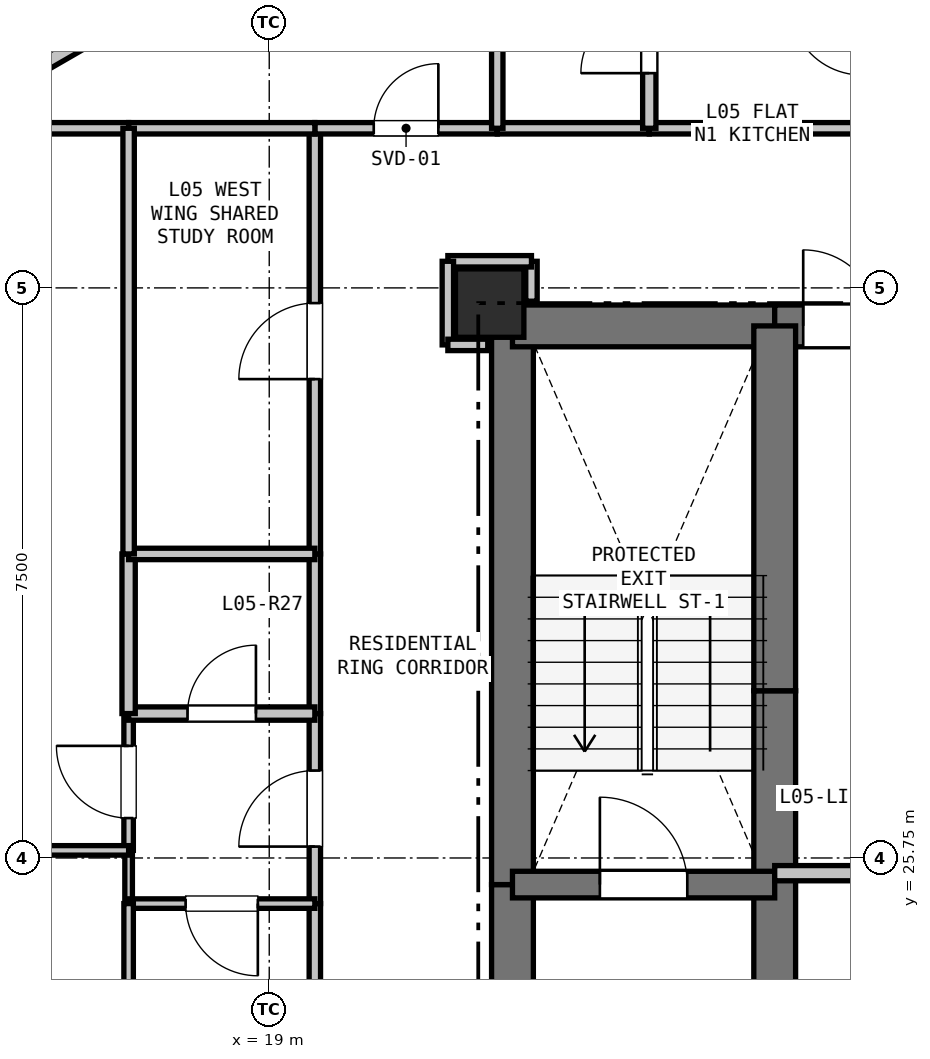
"""IFC4 building model, lengths in metres.
Left out: names, types, materials, properties, quantities, classifications, styles, units other than length and angle.
Written with IfcOpenShell. Run it as: python <this file> out.ifc"""

import sys

from ifc_helpers import new_model, si_unit, direction, frame, frame_2d, origin, origin_2d, place, context, subcontext, project, spatial, rectangle, extrude, element, fill, save


model = new_model("IFC4")
c1 = context("Model", 3, precision=1e-05, world=origin(), true_north=direction((0.0, 1.0)))
c2 = subcontext(c1, "Body", "Model", "MODEL_VIEW")
j1 = project(units=[si_unit("LENGTHUNIT", "METRE"), si_unit("PLANEANGLEUNIT", "RADIAN")], contexts=[c1])
p1 = place(None, origin())
s1 = spatial("IfcSite", under=j1, at=p1, CompositionType="ELEMENT")
p2 = place(p1, origin())
s2 = spatial("IfcBuilding", under=s1, at=p2, CompositionType="ELEMENT")
p3 = place(p2, frame((0.0, 0.0, 22.5)))
s3 = spatial("IfcBuildingStorey", under=s2, at=p3, CompositionType="ELEMENT", Elevation=22.5)
p4 = place(p3, frame((21.9, 33.05, 0.0), z_axis=(0.0, 0.0, 1.0), x_axis=(1.0, 0.0, 0.0)))
e1 = element("IfcColumn", 1, at=p4, inside=s3, PredefinedType="COLUMN", context=c2, shape_type="SweptSolid", body=[
    extrude(rectangle(XDim=0.9, YDim=0.9, at=origin_2d()), origin(), (0.0, 0.0, 1.0), 3.3),
])
p5 = place(p3, frame((15.008, 35.611, 0.0), z_axis=(0.0, 0.0, 1.0), x_axis=(0.86605165483, 0.499954529098, 0.0)))
e2 = element("IfcWall", 2, at=p5, inside=s3, PredefinedType="PARAPET", context=c2, shape_type="SweptSolid", body=[
    extrude(rectangle(XDim=1.7, YDim=0.2, at=frame_2d((0.85, 0.0))), origin(), (0.0, 0.0, 1.0), 2.66),
])
p6 = place(p3, frame((22.2, 20.75, 0.0), z_axis=(0.0, 0.0, 1.0), x_axis=(0.0, 1.0, 0.0)))
e3 = element("IfcWall", 3, at=p6, inside=s3, PredefinedType="SHEAR", context=c2, shape_type="SweptSolid", body=[
    extrude(rectangle(XDim=4.65, YDim=0.55, at=frame_2d((2.325, 0.0))), origin(), (0.0, 0.0, 1.0), 3.04),
])
p7 = place(p3, frame((22.2, 25.4, 0.0), z_axis=(0.0, 0.0, 1.0), x_axis=(0.0, 1.0, 0.0)))
e4 = element("IfcWall", 4, at=p7, inside=s3, PredefinedType="SHEAR", context=c2, shape_type="SweptSolid", body=[
    extrude(rectangle(XDim=7.35, YDim=0.55, at=frame_2d((3.675, 0.0))), origin(), (0.0, 0.0, 1.0), 3.04),
])
p8 = place(p3, frame((22.2, 32.75, 0.0), z_axis=(0.0, 0.0, 1.0), x_axis=(1.0, 0.0, 0.0)))
e5 = element("IfcWall", 5, at=p8, inside=s3, PredefinedType="SHEAR", context=c2, shape_type="SweptSolid", body=[
    extrude(rectangle(XDim=3.45, YDim=0.55, at=frame_2d((1.725, 0.0))), origin(), (0.0, 0.0, 1.0), 3.04),
])
p9 = place(p3, frame((25.65, 32.75, 0.0), z_axis=(0.0, 0.0, 1.0), x_axis=(1.0, 0.0, 0.0)))
e6 = element("IfcWall", 6, at=p9, inside=s3, PredefinedType="SHEAR", context=c2, shape_type="SweptSolid", body=[
    extrude(rectangle(XDim=1.75, YDim=0.55, at=frame_2d((0.875, 0.0))), origin(), (0.0, 0.0, 1.0), 3.04),
])
p10 = place(p9, frame((0.375, 0.0, 0.0)))
e7 = element("IfcOpeningElement", 7, at=p10, cuts=e6, PredefinedType="OPENING", context=c2, shape_type="SweptSolid", body=[
    extrude(rectangle(XDim=1.0, YDim=2.15, at=frame_2d((0.5, 1.075))), frame((0.0, 0.285, 0.0), z_axis=(0.0, -1.0, 0.0), x_axis=(1.0, 0.0, 0.0)), (0.0, 0.0, 1.0), 0.57),
])
p11 = place(p3, frame((25.65, 22.75, 0.0), z_axis=(0.0, 0.0, 1.0), x_axis=(0.0, 1.0, 0.0)))
e8 = element("IfcWall", 8, at=p11, inside=s3, PredefinedType="SHEAR", context=c2, shape_type="SweptSolid", body=[
    extrude(rectangle(XDim=2.8, YDim=0.55, at=frame_2d((1.4, 0.0))), origin(), (0.0, 0.0, 1.0), 3.04),
])
p12 = place(p3, frame((25.65, 25.55, 0.0), z_axis=(0.0, 0.0, 1.0), x_axis=(0.0, 1.0, 0.0)))
e9 = element("IfcWall", 9, at=p12, inside=s3, PredefinedType="SHEAR", context=c2, shape_type="SweptSolid", body=[
    extrude(rectangle(XDim=2.4, YDim=0.55, at=frame_2d((1.2, 0.0))), origin(), (0.0, 0.0, 1.0), 3.04),
])
p13 = place(p3, frame((25.65, 27.95, 0.0), z_axis=(0.0, 0.0, 1.0), x_axis=(0.0, 1.0, 0.0)))
e10 = element("IfcWall", 10, at=p13, inside=s3, PredefinedType="SHEAR", context=c2, shape_type="SweptSolid", body=[
    extrude(rectangle(XDim=4.8, YDim=0.55, at=frame_2d((2.4, 0.0))), origin(), (0.0, 0.0, 1.0), 3.04),
])
p14 = place(p3, frame((22.2, 25.4, 0.0), z_axis=(0.0, 0.0, 1.0), x_axis=(1.0, 0.0, 0.0)))
e11 = element("IfcWall", 11, at=p14, inside=s3, PredefinedType="SHEAR", context=c2, shape_type="SweptSolid", body=[
    extrude(rectangle(XDim=3.45, YDim=0.35, at=frame_2d((1.725, 0.0))), origin(), (0.0, 0.0, 1.0), 3.04),
])
p15 = place(p14, frame((1.15, 0.0, 0.0)))
e12 = element("IfcOpeningElement", 12, at=p15, cuts=e11, PredefinedType="OPENING", context=c2, shape_type="SweptSolid", body=[
    extrude(rectangle(XDim=1.15, YDim=2.15, at=frame_2d((0.575, 1.075))), frame((0.0, 0.185, 0.0), z_axis=(0.0, -1.0, 0.0), x_axis=(1.0, 0.0, 0.0)), (0.0, 0.0, 1.0), 0.37),
])
p16 = place(p3, frame((25.65, 25.55, 0.0), z_axis=(0.0, 0.0, 1.0), x_axis=(1.0, 0.0, 0.0)))
e13 = element("IfcWall", 13, at=p16, inside=s3, PredefinedType="PARTITIONING", context=c2, shape_type="SweptSolid", body=[
    extrude(rectangle(XDim=4.95, YDim=0.2, at=frame_2d((2.475, 0.0))), origin(), (0.0, 0.0, 1.0), 3.04),
])
p17 = place(p3, frame((19.6, 21.15, 0.0), z_axis=(0.0, 0.0, 1.0), x_axis=(0.0, 1.0, 0.0)))
e14 = element("IfcWall", 14, at=p17, inside=s3, PredefinedType="PARTITIONING", context=c2, shape_type="SweptSolid", body=[
    extrude(rectangle(XDim=4.0, YDim=0.15, at=frame_2d((2.0, 0.0))), origin(), (0.0, 0.0, 1.0), 3.04),
])
p18 = place(p3, frame((19.6, 25.15, 0.0), z_axis=(0.0, 0.0, 1.0), x_axis=(0.0, 1.0, 0.0)))
e15 = element("IfcWall", 15, at=p18, inside=s3, PredefinedType="PARTITIONING", context=c2, shape_type="SweptSolid", body=[
    extrude(rectangle(XDim=2.5, YDim=0.15, at=frame_2d((1.25, 0.0))), origin(), (0.0, 0.0, 1.0), 3.04),
])
p19 = place(p18, frame((0.75, 0.0, 0.0)))
e16 = element("IfcOpeningElement", 16, at=p19, cuts=e15, PredefinedType="OPENING", context=c2, shape_type="SweptSolid", body=[
    extrude(rectangle(XDim=1.0, YDim=2.15, at=frame_2d((0.5, 1.075))), frame((0.0, 0.085, 0.0), z_axis=(0.0, -1.0, 0.0), x_axis=(1.0, 0.0, 0.0)), (0.0, 0.0, 1.0), 0.17),
])
p20 = place(p3, frame((19.6, 27.65, 0.0), z_axis=(0.0, 0.0, 1.0), x_axis=(0.0, 1.0, 0.0)))
e17 = element("IfcWall", 17, at=p20, inside=s3, PredefinedType="PARTITIONING", context=c2, shape_type="SweptSolid", body=[
    extrude(rectangle(XDim=2.1, YDim=0.15, at=frame_2d((1.05, 0.0))), origin(), (0.0, 0.0, 1.0), 3.04),
])
p21 = place(p3, frame((19.6, 29.75, 0.0), z_axis=(0.0, 0.0, 1.0), x_axis=(0.0, 1.0, 0.0)))
e18 = element("IfcWall", 18, at=p21, inside=s3, PredefinedType="PARTITIONING", context=c2, shape_type="SweptSolid", body=[
    extrude(rectangle(XDim=5.6, YDim=0.15, at=frame_2d((2.8, 0.0))), origin(), (0.0, 0.0, 1.0), 2.337),
])
p22 = place(p21, frame((2.3, 0.0, 0.0)))
e19 = element("IfcOpeningElement", 19, at=p22, cuts=e18, PredefinedType="OPENING", context=c2, shape_type="SweptSolid", body=[
    extrude(rectangle(XDim=1.0, YDim=2.15, at=frame_2d((0.5, 1.075))), frame((0.0, 0.085, 0.0), z_axis=(0.0, -1.0, 0.0), x_axis=(1.0, 0.0, 0.0)), (0.0, 0.0, 1.0), 0.17),
])
p23 = place(p3, frame((19.6, 35.35, 0.0), z_axis=(0.0, 0.0, 1.0), x_axis=(1.0, 0.0, 0.0)))
e20 = element("IfcWall", 20, at=p23, inside=s3, PredefinedType="PARTITIONING", context=c2, shape_type="SweptSolid", body=[
    extrude(rectangle(XDim=2.4, YDim=0.15, at=frame_2d((1.2, 0.0))), origin(), (0.0, 0.0, 1.0), 3.04),
])
p24 = place(p23, frame((0.775, 0.0, 0.0)))
e21 = element("IfcOpeningElement", 21, at=p24, cuts=e20, PredefinedType="OPENING", context=c2, shape_type="SweptSolid", body=[
    extrude(rectangle(XDim=0.85, YDim=2.1, at=frame_2d((0.425, 1.05))), frame((0.0, 0.085, 0.0), z_axis=(0.0, -1.0, 0.0), x_axis=(1.0, 0.0, 0.0)), (0.0, 0.0, 1.0), 0.17),
])
p25 = place(p3, frame((22.0, 35.35, 0.0), z_axis=(0.0, 0.0, 1.0), x_axis=(1.0, 0.0, 0.0)))
e22 = element("IfcWall", 22, at=p25, inside=s3, PredefinedType="PARTITIONING", context=c2, shape_type="SweptSolid", body=[
    extrude(rectangle(XDim=2.0, YDim=0.15, at=frame_2d((1.0, 0.0))), origin(), (0.0, 0.0, 1.0), 3.04),
])
p26 = place(p3, frame((24.0, 35.35, 0.0), z_axis=(0.0, 0.0, 1.0), x_axis=(1.0, 0.0, 0.0)))
e23 = element("IfcWall", 23, at=p26, inside=s3, PredefinedType="PARTITIONING", context=c2, shape_type="SweptSolid", body=[
    extrude(rectangle(XDim=2.8, YDim=0.15, at=frame_2d((1.4, 0.0))), origin(), (0.0, 0.0, 1.0), 3.04),
])
p27 = place(p3, frame((22.45, 33.075, 0.0), z_axis=(0.0, 0.0, 1.0), x_axis=(0.0, 1.0, 0.0)))
e24 = element("IfcWall", 24, at=p27, inside=s3, PredefinedType="PARTITIONING", context=c2, shape_type="SweptSolid", body=[
    extrude(rectangle(XDim=0.525, YDim=0.15, at=frame_2d((0.263, 0.0))), origin(), (0.0, 0.0, 1.0), 2.488),
])
p28 = place(p3, frame((22.45, 33.6, 0.0), z_axis=(0.0, 0.0, 1.0), x_axis=(-1.0, 0.0, 0.0)))
e25 = element("IfcWall", 25, at=p28, inside=s3, PredefinedType="PARTITIONING", context=c2, shape_type="SweptSolid", body=[
    extrude(rectangle(XDim=1.1, YDim=0.15, at=frame_2d((0.55, 0.0))), origin(), (0.0, 0.0, 1.0), 3.04),
])
p29 = place(p3, frame((21.35, 33.6, 0.0), z_axis=(0.0, 0.0, 1.0), x_axis=(0.0, -1.0, 0.0)))
e26 = element("IfcWall", 26, at=p29, inside=s3, PredefinedType="PARTITIONING", context=c2, shape_type="SweptSolid", body=[
    extrude(rectangle(XDim=1.1, YDim=0.15, at=frame_2d((0.55, 0.0))), origin(), (0.0, 0.0, 1.0), 2.337),
])
p30 = place(p3, frame((21.35, 32.5, 0.0), z_axis=(0.0, 0.0, 1.0), x_axis=(1.0, 0.0, 0.0)))
e27 = element("IfcWall", 27, at=p30, inside=s3, PredefinedType="PARTITIONING", context=c2, shape_type="SweptSolid", body=[
    extrude(rectangle(XDim=0.525, YDim=0.15, at=frame_2d((0.262, 0.0))), origin(), (0.0, 0.0, 1.0), 2.488),
])
p31 = place(p3, frame((17.15, 25.15, 0.0), z_axis=(0.0, 0.0, 1.0), x_axis=(0.0, 1.0, 0.0)))
e28 = element("IfcWall", 28, at=p31, inside=s3, PredefinedType="PARTITIONING", context=c2, shape_type="SweptSolid", body=[
    extrude(rectangle(XDim=0.7, YDim=0.1, at=frame_2d((0.35, 0.0))), origin(), (0.0, 0.0, 1.0), 3.04),
])
p32 = place(p3, frame((17.15, 25.85, 0.0), z_axis=(0.0, 0.0, 1.0), x_axis=(0.0, 1.0, 0.0)))
e29 = element("IfcWall", 29, at=p32, inside=s3, PredefinedType="PARTITIONING", context=c2, shape_type="SweptSolid", body=[
    extrude(rectangle(XDim=1.8, YDim=0.125, at=frame_2d((0.9, 0.0))), origin(), (0.0, 0.0, 1.0), 3.04),
])
p33 = place(p32, frame((0.425, 0.0, 0.0)))
e30 = element("IfcOpeningElement", 30, at=p33, cuts=e29, PredefinedType="OPENING", context=c2, shape_type="SweptSolid", body=[
    extrude(rectangle(XDim=0.95, YDim=2.1, at=frame_2d((0.475, 1.05))), frame((0.0, 0.073, 0.0), z_axis=(0.0, -1.0, 0.0), x_axis=(1.0, 0.0, 0.0)), (0.0, 0.0, 1.0), 0.145),
])
p34 = place(p3, frame((17.15, 27.65, 0.0), z_axis=(0.0, 0.0, 1.0), x_axis=(1.0, 0.0, 0.0)))
e31 = element("IfcWall", 31, at=p34, inside=s3, PredefinedType="PLUMBINGWALL", context=c2, shape_type="SweptSolid", body=[
    extrude(rectangle(XDim=2.45, YDim=0.175, at=frame_2d((1.225, 0.0))), origin(), (0.0, 0.0, 1.0), 3.04),
])
p35 = place(p34, frame((0.775, 0.0, 0.0)))
e32 = element("IfcOpeningElement", 32, at=p35, cuts=e31, PredefinedType="OPENING", context=c2, shape_type="SweptSolid", body=[
    extrude(rectangle(XDim=0.9, YDim=2.1, at=frame_2d((0.45, 1.05))), frame((0.0, 0.097, 0.0), z_axis=(0.0, -1.0, 0.0), x_axis=(1.0, 0.0, 0.0)), (0.0, 0.0, 1.0), 0.195),
])
p36 = place(p3, frame((19.6, 25.15, 0.0), z_axis=(0.0, 0.0, 1.0), x_axis=(-1.0, 0.0, 0.0)))
e33 = element("IfcWall", 33, at=p36, inside=s3, PredefinedType="PARTITIONING", context=c2, shape_type="SweptSolid", body=[
    extrude(rectangle(XDim=2.45, YDim=0.125, at=frame_2d((1.225, 0.0))), origin(), (0.0, 0.0, 1.0), 3.04),
])
p37 = place(p36, frame((0.75, 0.0, 0.0)))
e34 = element("IfcOpeningElement", 34, at=p37, cuts=e33, PredefinedType="OPENING", context=c2, shape_type="SweptSolid", body=[
    extrude(rectangle(XDim=0.95, YDim=2.1, at=frame_2d((0.475, 1.05))), frame((0.0, 0.073, 0.0), z_axis=(0.0, -1.0, 0.0), x_axis=(1.0, 0.0, 0.0)), (0.0, 0.0, 1.0), 0.145),
])
p38 = place(p3, frame((24.0, 35.35, 0.0), z_axis=(0.0, 0.0, 1.0), x_axis=(0.0, 1.0, 0.0)))
e35 = element("IfcWall", 35, at=p38, inside=s3, PredefinedType="PLUMBINGWALL", context=c2, shape_type="SweptSolid", body=[
    extrude(rectangle(XDim=2.35, YDim=0.175, at=frame_2d((1.175, 0.0))), origin(), (0.0, 0.0, 1.0), 3.04),
])
p39 = place(p38, frame((0.725, 0.0, 0.0)))
e36 = element("IfcOpeningElement", 36, at=p39, cuts=e35, PredefinedType="OPENING", context=c2, shape_type="SweptSolid", body=[
    extrude(rectangle(XDim=0.9, YDim=2.1, at=frame_2d((0.45, 1.05))), frame((0.0, 0.097, 0.0), z_axis=(0.0, -1.0, 0.0), x_axis=(1.0, 0.0, 0.0)), (0.0, 0.0, 1.0), 0.195),
])
p40 = place(p3, frame((22.0, 35.35, 0.0), z_axis=(0.0, 0.0, 1.0), x_axis=(0.0, 1.0, 0.0)))
e37 = element("IfcWall", 37, at=p40, inside=s3, PredefinedType="PARTITIONING", context=c2, shape_type="SweptSolid", body=[
    extrude(rectangle(XDim=2.35, YDim=0.15, at=frame_2d((1.175, 0.0))), origin(), (0.0, 0.0, 1.0), 3.04),
])
p41 = place(p3, frame((17.15, 27.65, 0.0), z_axis=(0.0, 0.0, 1.0), x_axis=(0.0, 1.0, 0.0)))
e38 = element("IfcWall", 38, at=p41, inside=s3, PredefinedType="PLUMBINGWALL", context=c2, shape_type="SweptSolid", body=[
    extrude(rectangle(XDim=2.1, YDim=0.175, at=frame_2d((1.05, 0.0))), origin(), (0.0, 0.0, 1.0), 3.04),
])
p42 = place(p3, frame((17.15, 29.75, 0.0), z_axis=(0.0, 0.0, 1.0), x_axis=(1.0, 0.0, 0.0)))
e39 = element("IfcWall", 39, at=p42, inside=s3, PredefinedType="PARTITIONING", context=c2, shape_type="SweptSolid", body=[
    extrude(rectangle(XDim=2.45, YDim=0.15, at=frame_2d((1.225, 0.0))), origin(), (0.0, 0.0, 1.0), 3.04),
])
p43 = place(p3, frame((17.15, 21.15, 0.0), z_axis=(0.0, 0.0, 1.0), x_axis=(0.0, 1.0, 0.0)))
e40 = element("IfcWall", 40, at=p43, inside=s3, PredefinedType="PARTITIONING", context=c2, shape_type="SweptSolid", body=[
    extrude(rectangle(XDim=4.0, YDim=0.125, at=frame_2d((2.0, 0.0))), origin(), (0.0, 0.0, 1.0), 2.337),
])
p44 = place(p43, frame((1.525, 0.0, 0.0)))
e41 = element("IfcOpeningElement", 41, at=p44, cuts=e40, PredefinedType="OPENING", context=c2, shape_type="SweptSolid", body=[
    extrude(rectangle(XDim=0.95, YDim=2.1, at=frame_2d((0.475, 1.05))), frame((0.0, 0.073, 0.0), z_axis=(0.0, -1.0, 0.0), x_axis=(1.0, 0.0, 0.0)), (0.0, 0.0, 1.0), 0.145),
])
p45 = place(p3, frame((19.6, 35.35, 0.0), z_axis=(0.0, 0.0, 1.0), x_axis=(-1.0, 0.0, 0.0)))
e42 = element("IfcWall", 42, at=p45, inside=s3, PredefinedType="PARTITIONING", context=c2, shape_type="SweptSolid", body=[
    extrude(rectangle(XDim=2.45, YDim=0.15, at=frame_2d((1.225, 0.0))), origin(), (0.0, 0.0, 1.0), 3.04),
])
p46 = place(p3, frame((17.15, 35.35, 0.0), z_axis=(0.0, 0.0, 1.0), x_axis=(-1.0, 0.0, 0.0)))
e43 = element("IfcWall", 43, at=p46, inside=s3, PredefinedType="PARTITIONING", context=c2, shape_type="SweptSolid", body=[
    extrude(rectangle(XDim=1.15, YDim=0.15, at=frame_2d((0.575, 0.0))), origin(), (0.0, 0.0, 1.0), 3.04),
])
p47 = place(p3, frame((17.15, 29.75, 0.0), z_axis=(0.0, 0.0, 1.0), x_axis=(0.0, 1.0, 0.0)))
e44 = element("IfcWall", 44, at=p47, inside=s3, PredefinedType="PARTITIONING", context=c2, shape_type="SweptSolid", body=[
    extrude(rectangle(XDim=5.6, YDim=0.15, at=frame_2d((2.8, 0.0))), origin(), (0.0, 0.0, 1.0), 2.337),
])
p48 = place(p3, frame((17.15, 25.85, 0.0), z_axis=(0.0, 0.0, 1.0), x_axis=(-1.0, 0.0, 0.0)))
e45 = element("IfcWall", 45, at=p48, inside=s3, PredefinedType="PARTITIONING", context=c2, shape_type="SweptSolid", body=[
    extrude(rectangle(XDim=6.67, YDim=0.125, at=frame_2d((3.335, 0.0))), origin(), (0.0, 0.0, 1.0), 3.04),
])
p49 = place(p48, frame((2.86, 0.0, 0.0)))
e46 = element("IfcOpeningElement", 46, at=p49, cuts=e45, PredefinedType="OPENING", context=c2, shape_type="SweptSolid", body=[
    extrude(rectangle(XDim=0.95, YDim=2.1, at=frame_2d((0.475, 1.05))), frame((0.0, 0.073, 0.0), z_axis=(0.0, -1.0, 0.0), x_axis=(1.0, 0.0, 0.0)), (0.0, 0.0, 1.0), 0.145),
])
p50 = place(p10, origin())
e47 = element("IfcDoor", 47, at=p50, inside=s3, OperationType="SINGLE_SWING_LEFT", PredefinedType="DOOR", context=c2, shape_type="SweptSolid", body=[
    extrude(rectangle(XDim=1.0, YDim=2.15, at=frame_2d((0.5, 1.075))), frame((0.0, 0.025, 0.0), z_axis=(0.0, -1.0, 0.0), x_axis=(1.0, 0.0, 0.0)), (0.0, 0.0, 1.0), 0.05),
])
fill(e7, e47)
p51 = place(p15, origin())
e48 = element("IfcDoor", 48, at=p51, inside=s3, OperationType="SINGLE_SWING_LEFT", PredefinedType="DOOR", context=c2, shape_type="SweptSolid", body=[
    extrude(rectangle(XDim=1.15, YDim=2.15, at=frame_2d((0.575, 1.075))), frame((0.0, 0.025, 0.0), z_axis=(0.0, -1.0, 0.0), x_axis=(1.0, 0.0, 0.0)), (0.0, 0.0, 1.0), 0.05),
])
fill(e12, e48)
p52 = place(p19, origin())
e49 = element("IfcDoor", 49, at=p52, inside=s3, OperationType="SINGLE_SWING_LEFT", PredefinedType="DOOR", context=c2, shape_type="SweptSolid", body=[
    extrude(rectangle(XDim=1.0, YDim=2.15, at=frame_2d((0.5, 1.075))), frame((0.0, 0.025, 0.0), z_axis=(0.0, -1.0, 0.0), x_axis=(1.0, 0.0, 0.0)), (0.0, 0.0, 1.0), 0.05),
])
fill(e16, e49)
p53 = place(p24, origin())
e50 = element("IfcDoor", 50, at=p53, inside=s3, OperationType="SINGLE_SWING_RIGHT", PredefinedType="DOOR", context=c2, shape_type="SweptSolid", body=[
    extrude(rectangle(XDim=0.85, YDim=2.1, at=frame_2d((0.425, 1.05))), frame((0.0, 0.025, 0.0), z_axis=(0.0, -1.0, 0.0), x_axis=(1.0, 0.0, 0.0)), (0.0, 0.0, 1.0), 0.05),
])
fill(e21, e50)
p54 = place(p22, origin())
e51 = element("IfcDoor", 51, at=p54, inside=s3, OperationType="SINGLE_SWING_LEFT", PredefinedType="DOOR", context=c2, shape_type="SweptSolid", body=[
    extrude(rectangle(XDim=1.0, YDim=2.15, at=frame_2d((0.5, 1.075))), frame((0.0, 0.025, 0.0), z_axis=(0.0, -1.0, 0.0), x_axis=(1.0, 0.0, 0.0)), (0.0, 0.0, 1.0), 0.05),
])
fill(e19, e51)
p55 = place(p35, origin())
e52 = element("IfcDoor", 52, at=p55, inside=s3, OperationType="SINGLE_SWING_RIGHT", PredefinedType="DOOR", context=c2, shape_type="SweptSolid", body=[
    extrude(rectangle(XDim=0.9, YDim=2.1, at=frame_2d((0.45, 1.05))), frame((0.0, 0.025, 0.0), z_axis=(0.0, -1.0, 0.0), x_axis=(1.0, 0.0, 0.0)), (0.0, 0.0, 1.0), 0.05),
])
fill(e32, e52)
p56 = place(p37, origin())
e53 = element("IfcDoor", 53, at=p56, inside=s3, OperationType="SINGLE_SWING_LEFT", PredefinedType="DOOR", context=c2, shape_type="SweptSolid", body=[
    extrude(rectangle(XDim=0.95, YDim=2.1, at=frame_2d((0.475, 1.05))), frame((0.0, 0.025, 0.0), z_axis=(0.0, -1.0, 0.0), x_axis=(1.0, 0.0, 0.0)), (0.0, 0.0, 1.0), 0.05),
])
fill(e34, e53)
p57 = place(p33, origin())
e54 = element("IfcDoor", 54, at=p57, inside=s3, OperationType="SINGLE_SWING_RIGHT", PredefinedType="DOOR", context=c2, shape_type="SweptSolid", body=[
    extrude(rectangle(XDim=0.95, YDim=2.1, at=frame_2d((0.475, 1.05))), frame((0.0, 0.025, 0.0), z_axis=(0.0, -1.0, 0.0), x_axis=(1.0, 0.0, 0.0)), (0.0, 0.0, 1.0), 0.05),
])
fill(e30, e54)
p58 = place(p39, origin())
e55 = element("IfcDoor", 55, at=p58, inside=s3, OperationType="SINGLE_SWING_LEFT", PredefinedType="DOOR", context=c2, shape_type="SweptSolid", body=[
    extrude(rectangle(XDim=0.9, YDim=2.1, at=frame_2d((0.45, 1.05))), frame((0.0, 0.025, 0.0), z_axis=(0.0, -1.0, 0.0), x_axis=(1.0, 0.0, 0.0)), (0.0, 0.0, 1.0), 0.05),
])
fill(e36, e55)
save(model, sys.argv[1])
